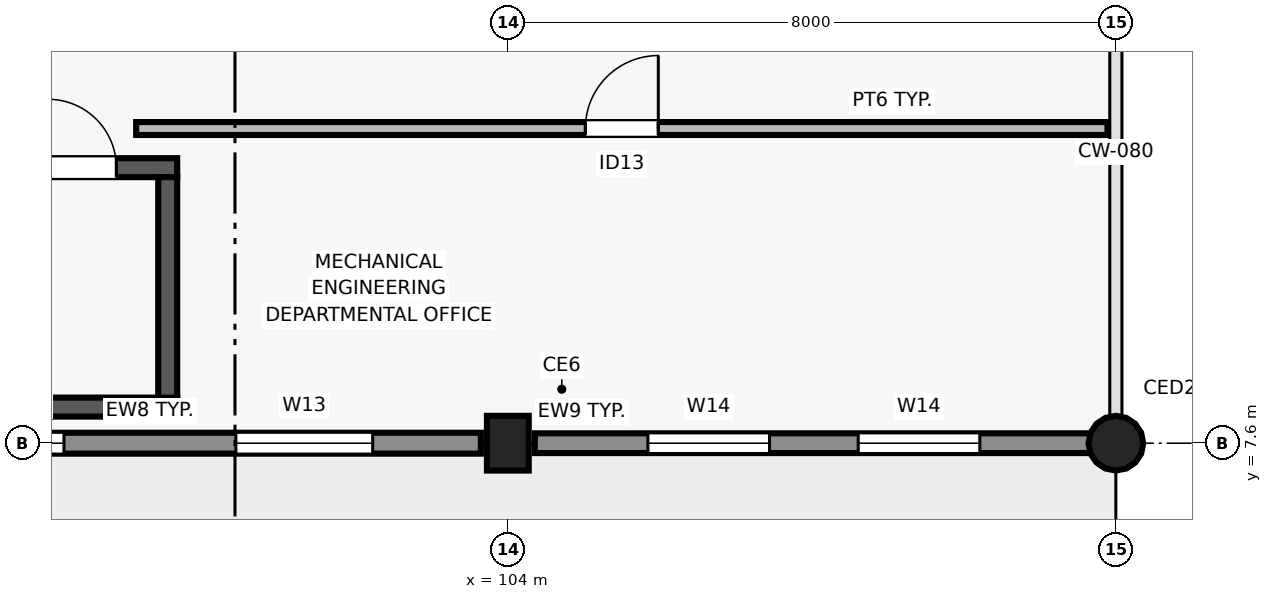
"""IFC4 building model, lengths in metres.
Left out: names, types, materials, properties, quantities, classifications, styles, units other than length and angle.
Written with IfcOpenShell. Run it as: python <this file> out.ifc"""

import sys

from ifc_helpers import new_model, si_unit, direction, frame, frame_2d, origin, origin_2d, place, context, subcontext, project, spatial, rectangle, circle, extrude, element, fill, save


model = new_model("IFC4")
c1 = context("Model", 3, precision=1e-05, world=origin(), true_north=direction((0.0, 1.0)))
c2 = subcontext(c1, "Body", "Model", "MODEL_VIEW")
j1 = project(units=[si_unit("LENGTHUNIT", "METRE"), si_unit("PLANEANGLEUNIT", "RADIAN")], contexts=[c1])
p1 = place(None, origin())
s1 = spatial("IfcSite", under=j1, at=p1, CompositionType="ELEMENT")
p2 = place(p1, origin())
s2 = spatial("IfcBuilding", under=s1, at=p2, CompositionType="ELEMENT")
p3 = place(p2, frame((0.0, 0.0, 9.0)))
s3 = spatial("IfcBuildingStorey", under=s2, at=p3, CompositionType="ELEMENT", Elevation=9.0)
p4 = place(p3, frame((104.0, 7.6, 0.0), z_axis=(0.0, 0.0, 1.0), x_axis=(1.0, 0.0, 0.0)))
e1 = element("IfcColumn", 1, at=p4, inside=s3, PredefinedType="COLUMN", context=c2, shape_type="SweptSolid", body=[
    extrude(rectangle(XDim=0.72, YDim=0.55, at=origin_2d()), origin(), (0.0, 0.0, 1.0), 4.2),
])
p5 = place(p3, frame((112.0, 7.6, 0.0), z_axis=(0.0, 0.0, 1.0), x_axis=(1.0, 0.0, 0.0)))
e2 = element("IfcColumn", 2, at=p5, inside=s3, PredefinedType="COLUMN", context=c2, shape_type="SweptSolid", body=[
    extrude(circle(Radius=0.36, at=origin_2d()), origin(), (0.0, 0.0, 1.0), 4.2),
])
p6 = place(p3, frame((96.37, 7.6, 0.0), z_axis=(0.0, 0.0, 1.0), x_axis=(1.0, 0.0, 0.0)))
e3 = element("IfcWall", 3, at=p6, inside=s3, PredefinedType="SOLIDWALL", context=c2, shape_type="SweptSolid", body=[
    extrude(rectangle(XDim=7.275, YDim=0.275, at=frame_2d((3.637, 0.0))), origin(), (0.0, 0.0, 1.0), 3.92),
])
p7 = place(p6, frame((0.84, 0.0, 0.9)))
e4 = element("IfcOpeningElement", 4, at=p7, cuts=e3, PredefinedType="OPENING", context=c2, shape_type="SweptSolid", body=[
    extrude(rectangle(XDim=0.95, YDim=1.25, at=frame_2d((0.475, 0.625))), frame((0.0, 0.147, 0.0), z_axis=(0.0, -1.0, 0.0), x_axis=(1.0, 0.0, 0.0)), (0.0, 0.0, 1.0), 0.295),
])
p8 = place(p6, frame((4.052, 0.0, 0.9)))
e5 = element("IfcOpeningElement", 5, at=p8, cuts=e3, PredefinedType="OPENING", context=c2, shape_type="SweptSolid", body=[
    extrude(rectangle(XDim=1.8, YDim=1.5, at=frame_2d((0.9, 0.75))), frame((0.0, 0.147, 0.0), z_axis=(0.0, -1.0, 0.0), x_axis=(1.0, 0.0, 0.0)), (0.0, 0.0, 1.0), 0.295),
])
p9 = place(p3, frame((104.355, 7.6, 0.0), z_axis=(0.0, 0.0, 1.0), x_axis=(1.0, 0.0, 0.0)))
e6 = element("IfcWall", 6, at=p9, inside=s3, PredefinedType="SOLIDWALL", context=c2, shape_type="SweptSolid", body=[
    extrude(rectangle(XDim=7.343, YDim=0.26, at=frame_2d((3.671, 0.0))), origin(), (0.0, 0.0, 1.0), 3.27),
])
p10 = place(p9, frame((1.488, 0.0, 0.9)))
e7 = element("IfcOpeningElement", 7, at=p10, cuts=e6, PredefinedType="OPENING", context=c2, shape_type="SweptSolid", body=[
    extrude(rectangle(XDim=1.6, YDim=1.5, at=frame_2d((0.8, 0.75))), frame((0.0, 0.14, 0.0), z_axis=(0.0, -1.0, 0.0), x_axis=(1.0, 0.0, 0.0)), (0.0, 0.0, 1.0), 0.28),
])
p11 = place(p9, frame((4.255, 0.0, 0.9)))
e8 = element("IfcOpeningElement", 8, at=p11, cuts=e6, PredefinedType="OPENING", context=c2, shape_type="SweptSolid", body=[
    extrude(rectangle(XDim=1.6, YDim=1.5, at=frame_2d((0.8, 0.75))), frame((0.0, 0.14, 0.0), z_axis=(0.0, -1.0, 0.0), x_axis=(1.0, 0.0, 0.0)), (0.0, 0.0, 1.0), 0.28),
])
p12 = place(p3, frame((97.15, 8.075, 0.0), z_axis=(0.0, 0.0, 1.0), x_axis=(1.0, 0.0, 0.0)))
e9 = element("IfcWall", 9, at=p12, inside=s3, PredefinedType="SHEAR", context=c2, shape_type="SweptSolid", body=[
    extrude(rectangle(XDim=2.5, YDim=0.25, at=frame_2d((1.25, 0.0))), origin(), (0.0, 0.0, 1.0), 3.92),
])
p13 = place(p3, frame((97.15, 11.225, 0.0), z_axis=(0.0, 0.0, 1.0), x_axis=(1.0, 0.0, 0.0)))
e10 = element("IfcWall", 10, at=p13, inside=s3, PredefinedType="SHEAR", context=c2, shape_type="SweptSolid", body=[
    extrude(rectangle(XDim=2.5, YDim=0.25, at=frame_2d((1.25, 0.0))), origin(), (0.0, 0.0, 1.0), 3.92),
])
p14 = place(p13, frame((0.8, 0.0, 0.0)))
e11 = element("IfcOpeningElement", 11, at=p14, cuts=e10, PredefinedType="OPENING", context=c2, shape_type="SweptSolid", body=[
    extrude(rectangle(XDim=0.9, YDim=2.05, at=frame_2d((0.45, 1.025))), frame((0.0, 0.135, 0.0), z_axis=(0.0, -1.0, 0.0), x_axis=(1.0, 0.0, 0.0)), (0.0, 0.0, 1.0), 0.27),
])
p15 = place(p3, frame((99.525, 8.2, 0.0), z_axis=(0.0, 0.0, 1.0), x_axis=(0.0, 1.0, 0.0)))
e12 = element("IfcWall", 12, at=p15, inside=s3, PredefinedType="SHEAR", context=c2, shape_type="SweptSolid", body=[
    extrude(rectangle(XDim=2.9, YDim=0.25, at=frame_2d((1.45, 0.0))), origin(), (0.0, 0.0, 1.0), 3.92),
])
p16 = place(p3, frame((99.11, 11.74, 0.0), z_axis=(0.0, 0.0, 1.0), x_axis=(1.0, 0.0, 0.0)))
e13 = element("IfcWall", 13, at=p16, inside=s3, PredefinedType="PARTITIONING", context=c2, shape_type="SweptSolid", body=[
    extrude(rectangle(XDim=12.78, YDim=0.17, at=frame_2d((6.39, 0.0))), origin(), (0.0, 0.0, 1.0), 3.9),
])
p17 = place(p16, frame((5.91, 0.0, 0.0)))
e14 = element("IfcOpeningElement", 14, at=p17, cuts=e13, PredefinedType="OPENING", context=c2, shape_type="SweptSolid", body=[
    extrude(rectangle(XDim=0.96, YDim=2.15, at=frame_2d((0.48, 1.075))), frame((0.0, 0.095, 0.0), z_axis=(0.0, -1.0, 0.0), x_axis=(1.0, 0.0, 0.0)), (0.0, 0.0, 1.0), 0.19),
])
p18 = place(p7, origin())
e15 = element("IfcWindow", 15, at=p18, inside=s3, PartitioningType="SINGLE_PANEL", PredefinedType="WINDOW", context=c2, shape_type="SweptSolid", body=[
    extrude(rectangle(XDim=0.95, YDim=1.25, at=frame_2d((0.475, 0.625))), frame((0.0, 0.03, 0.0), z_axis=(0.0, -1.0, 0.0), x_axis=(1.0, 0.0, 0.0)), (0.0, 0.0, 1.0), 0.06),
])
fill(e4, e15)
p19 = place(p8, origin())
e16 = element("IfcWindow", 16, at=p19, inside=s3, PartitioningType="SINGLE_PANEL", PredefinedType="WINDOW", context=c2, shape_type="SweptSolid", body=[
    extrude(rectangle(XDim=1.8, YDim=1.5, at=frame_2d((0.9, 0.75))), frame((0.0, 0.03, 0.0), z_axis=(0.0, -1.0, 0.0), x_axis=(1.0, 0.0, 0.0)), (0.0, 0.0, 1.0), 0.06),
])
fill(e5, e16)
p20 = place(p10, origin())
e17 = element("IfcWindow", 17, at=p20, inside=s3, PartitioningType="SINGLE_PANEL", PredefinedType="WINDOW", context=c2, shape_type="SweptSolid", body=[
    extrude(rectangle(XDim=1.6, YDim=1.5, at=frame_2d((0.8, 0.75))), frame((0.0, 0.03, 0.0), z_axis=(0.0, -1.0, 0.0), x_axis=(1.0, 0.0, 0.0)), (0.0, 0.0, 1.0), 0.06),
])
fill(e7, e17)
p21 = place(p11, origin())
e18 = element("IfcWindow", 18, at=p21, inside=s3, PartitioningType="SINGLE_PANEL", PredefinedType="WINDOW", context=c2, shape_type="SweptSolid", body=[
    extrude(rectangle(XDim=1.6, YDim=1.5, at=frame_2d((0.8, 0.75))), frame((0.0, 0.03, 0.0), z_axis=(0.0, -1.0, 0.0), x_axis=(1.0, 0.0, 0.0)), (0.0, 0.0, 1.0), 0.06),
])
fill(e8, e18)
p22 = place(p14, origin())
e19 = element("IfcDoor", 19, at=p22, inside=s3, OperationType="SINGLE_SWING_LEFT", PredefinedType="DOOR", context=c2, shape_type="SweptSolid", body=[
    extrude(rectangle(XDim=0.9, YDim=2.05, at=frame_2d((0.45, 1.025))), frame((0.0, 0.025, 0.0), z_axis=(0.0, -1.0, 0.0), x_axis=(1.0, 0.0, 0.0)), (0.0, 0.0, 1.0), 0.05),
])
fill(e11, e19)
p23 = place(p17, origin())
e20 = element("IfcDoor", 20, at=p23, inside=s3, OperationType="SINGLE_SWING_RIGHT", PredefinedType="DOOR", context=c2, shape_type="SweptSolid", body=[
    extrude(rectangle(XDim=0.96, YDim=2.15, at=frame_2d((0.48, 1.075))), frame((0.0, 0.025, 0.0), z_axis=(0.0, -1.0, 0.0), x_axis=(1.0, 0.0, 0.0)), (0.0, 0.0, 1.0), 0.05),
])
fill(e14, e20)
save(model, sys.argv[1])
